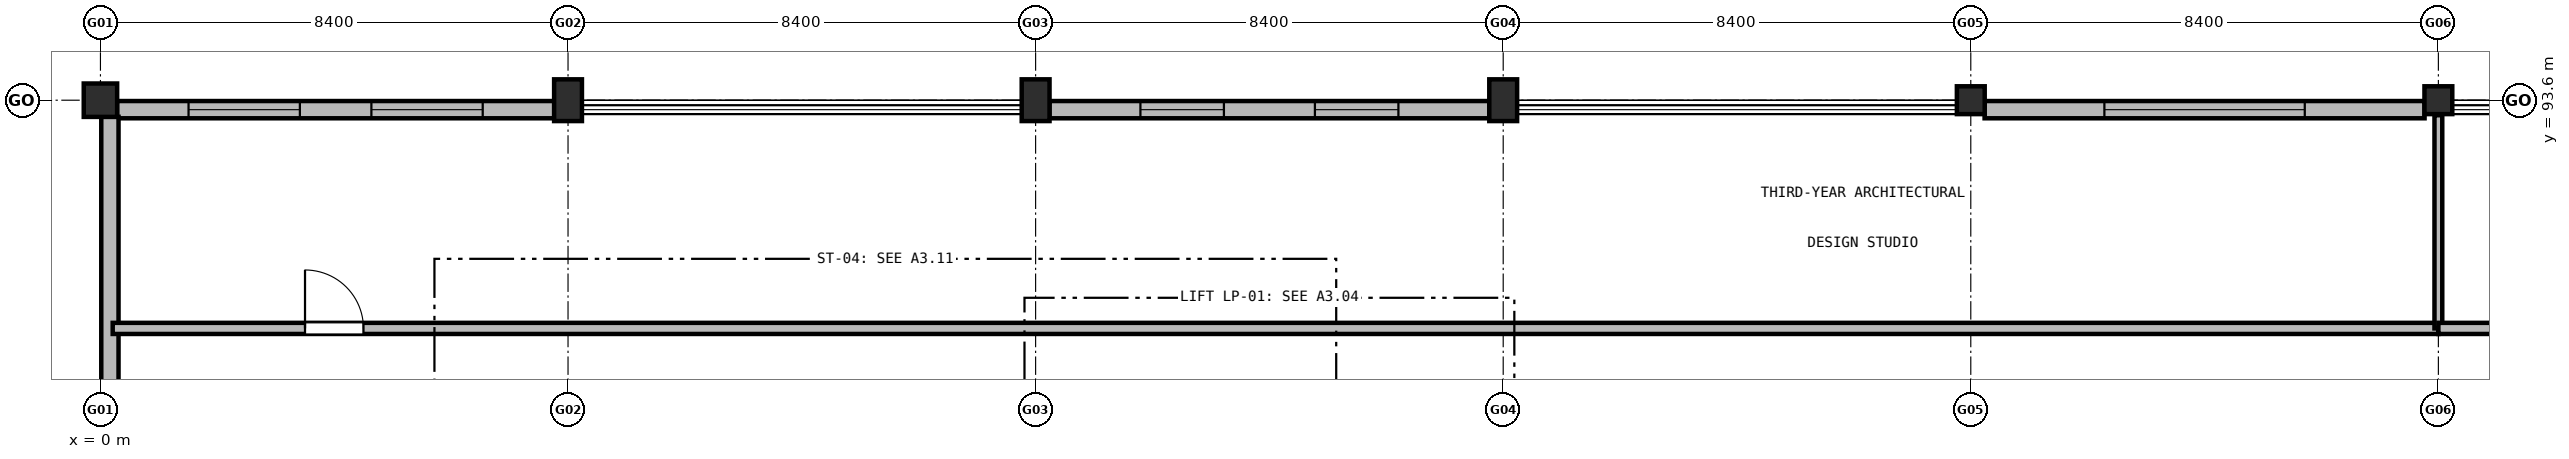
"""IFC4 building model, lengths in metres.
Left out: names, types, materials, properties, quantities, classifications, styles, units other than length and angle.
Written with IfcOpenShell. Run it as: python <this file> out.ifc"""

import sys

from ifc_helpers import new_model, si_unit, direction, frame, frame_2d, origin, origin_2d, place, context, subcontext, project, spatial, rectangle, extrude, element, fill, save


model = new_model("IFC4")
c1 = context("Model", 3, precision=1e-05, world=origin(), true_north=direction((0.0, 1.0)))
c2 = subcontext(c1, "Body", "Model", "MODEL_VIEW")
j1 = project(units=[si_unit("LENGTHUNIT", "METRE"), si_unit("PLANEANGLEUNIT", "RADIAN")], contexts=[c1])
p1 = place(None, origin())
s1 = spatial("IfcSite", under=j1, at=p1, CompositionType="ELEMENT")
p2 = place(p1, origin())
s2 = spatial("IfcBuilding", under=s1, at=p2, CompositionType="ELEMENT")
p3 = place(p2, frame((0.0, 0.0, 13.5)))
s3 = spatial("IfcBuildingStorey", under=s2, at=p3, CompositionType="ELEMENT", Elevation=13.5)
p4 = place(p3, frame((0.0, 93.6, 0.0), z_axis=(0.0, 0.0, 1.0), x_axis=(1.0, 0.0, 0.0)))
e1 = element("IfcColumn", 1, at=p4, inside=s3, PredefinedType="COLUMN", context=c2, shape_type="SweptSolid", body=[
    extrude(rectangle(XDim=0.6, YDim=0.6, at=origin_2d()), origin(), (0.0, 0.0, 1.0), 4.2),
])
for number, where, z_axis, x_axis in (
    (2, (8.4, 93.6, 0.0), (0.0, 0.0, 1.0), (1.0, 0.0, 0.0)),
    (3, (16.8, 93.6, 0.0), (0.0, 0.0, 1.0), (1.0, 0.0, 0.0)),
    (4, (25.2, 93.6, 0.0), (0.0, 0.0, 1.0), (1.0, 0.0, 0.0)),
):
    element("IfcColumn", number, at=place(p3, frame(where, z_axis=z_axis, x_axis=x_axis)), inside=s3, PredefinedType="COLUMN", context=c2, shape_type="SweptSolid", body=[
        extrude(rectangle(XDim=0.5, YDim=0.75, at=origin_2d()), origin(), (0.0, 0.0, 1.0), 4.2),
    ])
for number, where, z_axis, x_axis in (
    (5, (33.6, 93.6, 0.0), (0.0, 0.0, 1.0), (1.0, 0.0, 0.0)),
    (6, (42.0, 93.6, 0.0), (0.0, 0.0, 1.0), (1.0, 0.0, 0.0)),
):
    element("IfcColumn", number, at=place(p3, frame(where, z_axis=z_axis, x_axis=x_axis)), inside=s3, PredefinedType="COLUMN", context=c2, shape_type="SweptSolid", body=[
        extrude(rectangle(XDim=0.5, YDim=0.5, at=origin_2d()), origin(), (0.0, 0.0, 1.0), 4.2),
    ])
p5 = place(p3, frame((0.298, 93.43, 0.0), z_axis=(0.0, 0.0, 1.0), x_axis=(1.0, 0.0, 0.0)))
e7 = element("IfcWall", 7, at=p5, inside=s3, PredefinedType="SOLIDWALL", context=c2, shape_type="SweptSolid", body=[
    extrude(rectangle(XDim=7.854, YDim=0.31, at=frame_2d((3.927, 0.0))), origin(), (0.0, 0.0, 1.0), 3.16),
])
p6 = place(p5, frame((1.285, 0.0, 0.95)))
e8 = element("IfcOpeningElement", 8, at=p6, cuts=e7, PredefinedType="OPENING", context=c2, shape_type="SweptSolid", body=[
    extrude(rectangle(XDim=2.0, YDim=1.5, at=frame_2d((1.0, 0.75))), frame((0.0, 0.165, 0.0), z_axis=(0.0, -1.0, 0.0), x_axis=(1.0, 0.0, 0.0)), (0.0, 0.0, 1.0), 0.33),
])
p7 = place(p5, frame((4.569, 0.0, 0.95)))
e9 = element("IfcOpeningElement", 9, at=p7, cuts=e7, PredefinedType="OPENING", context=c2, shape_type="SweptSolid", body=[
    extrude(rectangle(XDim=2.0, YDim=1.5, at=frame_2d((1.0, 0.75))), frame((0.0, 0.165, 0.0), z_axis=(0.0, -1.0, 0.0), x_axis=(1.0, 0.0, 0.0)), (0.0, 0.0, 1.0), 0.33),
])
p8 = place(p3, frame((17.048, 93.43, 0.0), z_axis=(0.0, 0.0, 1.0), x_axis=(1.0, 0.0, 0.0)))
e10 = element("IfcWall", 10, at=p8, inside=s3, PredefinedType="SOLIDWALL", context=c2, shape_type="SweptSolid", body=[
    extrude(rectangle(XDim=7.904, YDim=0.31, at=frame_2d((3.952, 0.0))), origin(), (0.0, 0.0, 1.0), 3.16),
])
p9 = place(p8, frame((1.635, 0.0, 0.95)))
e11 = element("IfcOpeningElement", 11, at=p9, cuts=e10, PredefinedType="OPENING", context=c2, shape_type="SweptSolid", body=[
    extrude(rectangle(XDim=1.5, YDim=1.4, at=frame_2d((0.75, 0.7))), frame((0.0, 0.165, 0.0), z_axis=(0.0, -1.0, 0.0), x_axis=(1.0, 0.0, 0.0)), (0.0, 0.0, 1.0), 0.33),
])
p10 = place(p8, frame((4.769, 0.0, 0.95)))
e12 = element("IfcOpeningElement", 12, at=p10, cuts=e10, PredefinedType="OPENING", context=c2, shape_type="SweptSolid", body=[
    extrude(rectangle(XDim=1.5, YDim=1.4, at=frame_2d((0.75, 0.7))), frame((0.0, 0.165, 0.0), z_axis=(0.0, -1.0, 0.0), x_axis=(1.0, 0.0, 0.0)), (0.0, 0.0, 1.0), 0.33),
])
p11 = place(p3, frame((33.848, 93.43, 0.0), z_axis=(0.0, 0.0, 1.0), x_axis=(1.0, 0.0, 0.0)))
e13 = element("IfcWall", 13, at=p11, inside=s3, PredefinedType="SOLIDWALL", context=c2, shape_type="SweptSolid", body=[
    extrude(rectangle(XDim=7.904, YDim=0.31, at=frame_2d((3.952, 0.0))), origin(), (0.0, 0.0, 1.0), 3.16),
])
p12 = place(p11, frame((2.152, 0.0, 0.95)))
e14 = element("IfcOpeningElement", 14, at=p12, cuts=e13, PredefinedType="OPENING", context=c2, shape_type="SweptSolid", body=[
    extrude(rectangle(XDim=3.6, YDim=1.96, at=frame_2d((1.8, 0.98))), frame((0.0, 0.165, 0.0), z_axis=(0.0, -1.0, 0.0), x_axis=(1.0, 0.0, 0.0)), (0.0, 0.0, 1.0), 0.33),
])
p13 = place(p3, frame((0.17, 86.698, 0.0), z_axis=(0.0, 0.0, 1.0), x_axis=(0.0, 1.0, 0.0)))
e15 = element("IfcWall", 15, at=p13, inside=s3, PredefinedType="SOLIDWALL", context=c2, shape_type="SweptSolid", body=[
    extrude(rectangle(XDim=6.604, YDim=0.31, at=frame_2d((3.302, 0.0))), origin(), (0.0, 0.0, 1.0), 3.36),
])
p14 = place(p3, frame((0.22, 89.5, 0.0), z_axis=(0.0, 0.0, 1.0), x_axis=(1.0, 0.0, 0.0)))
e16 = element("IfcWall", 16, at=p14, inside=s3, PredefinedType="SOLIDWALL", context=c2, shape_type="SweptSolid", body=[
    extrude(rectangle(XDim=41.78, YDim=0.2, at=frame_2d((20.89, 0.0))), origin(), (0.0, 0.0, 1.0), 3.355),
])
p15 = place(p14, frame((3.455, 0.0, 0.0)))
e17 = element("IfcOpeningElement", 17, at=p15, cuts=e16, PredefinedType="OPENING", context=c2, shape_type="SweptSolid", body=[
    extrude(rectangle(XDim=1.05, YDim=2.15, at=frame_2d((0.525, 1.075))), frame((0.0, 0.11, 0.0), z_axis=(0.0, -1.0, 0.0), x_axis=(1.0, 0.0, 0.0)), (0.0, 0.0, 1.0), 0.22),
])
p16 = place(p3, frame((42.0, 89.5, 0.0), z_axis=(0.0, 0.0, 1.0), x_axis=(0.0, 1.0, 0.0)))
e18 = element("IfcWall", 18, at=p16, inside=s3, PredefinedType="PARTITIONING", context=c2, shape_type="SweptSolid", body=[
    extrude(rectangle(XDim=3.83, YDim=0.14, at=frame_2d((1.915, 0.0))), origin(), (0.0, 0.0, 1.0), 3.155),
])
p17 = place(p3, frame((42.0, 89.5, 0.0), z_axis=(0.0, 0.0, 1.0), x_axis=(1.0, 0.0, 0.0)))
e19 = element("IfcWall", 19, at=p17, inside=s3, PredefinedType="SOLIDWALL", context=c2, shape_type="SweptSolid", body=[
    extrude(rectangle(XDim=42.0, YDim=0.2, at=frame_2d((21.0, 0.0))), origin(), (0.0, 0.0, 1.0), 3.355),
])
p18 = place(p17, frame((3.7, 0.0, 0.0)))
e20 = element("IfcOpeningElement", 20, at=p18, cuts=e19, PredefinedType="OPENING", context=c2, shape_type="SweptSolid", body=[
    extrude(rectangle(XDim=1.0, YDim=2.1, at=frame_2d((0.5, 1.05))), frame((0.0, 0.11, 0.0), z_axis=(0.0, -1.0, 0.0), x_axis=(1.0, 0.0, 0.0)), (0.0, 0.0, 1.0), 0.22),
])
p19 = place(p6, origin())
e21 = element("IfcWindow", 21, at=p19, inside=s3, PartitioningType="SINGLE_PANEL", PredefinedType="WINDOW", context=c2, shape_type="SweptSolid", body=[
    extrude(rectangle(XDim=2.0, YDim=1.5, at=frame_2d((1.0, 0.75))), frame((0.0, 0.03, 0.0), z_axis=(0.0, -1.0, 0.0), x_axis=(1.0, 0.0, 0.0)), (0.0, 0.0, 1.0), 0.06),
])
fill(e8, e21)
p20 = place(p7, origin())
e22 = element("IfcWindow", 22, at=p20, inside=s3, PartitioningType="SINGLE_PANEL", PredefinedType="WINDOW", context=c2, shape_type="SweptSolid", body=[
    extrude(rectangle(XDim=2.0, YDim=1.5, at=frame_2d((1.0, 0.75))), frame((0.0, 0.03, 0.0), z_axis=(0.0, -1.0, 0.0), x_axis=(1.0, 0.0, 0.0)), (0.0, 0.0, 1.0), 0.06),
])
fill(e9, e22)
p21 = place(p9, origin())
e23 = element("IfcWindow", 23, at=p21, inside=s3, PartitioningType="SINGLE_PANEL", PredefinedType="WINDOW", context=c2, shape_type="SweptSolid", body=[
    extrude(rectangle(XDim=1.5, YDim=1.4, at=frame_2d((0.75, 0.7))), frame((0.0, 0.03, 0.0), z_axis=(0.0, -1.0, 0.0), x_axis=(1.0, 0.0, 0.0)), (0.0, 0.0, 1.0), 0.06),
])
fill(e11, e23)
p22 = place(p10, origin())
e24 = element("IfcWindow", 24, at=p22, inside=s3, PartitioningType="SINGLE_PANEL", PredefinedType="WINDOW", context=c2, shape_type="SweptSolid", body=[
    extrude(rectangle(XDim=1.5, YDim=1.4, at=frame_2d((0.75, 0.7))), frame((0.0, 0.03, 0.0), z_axis=(0.0, -1.0, 0.0), x_axis=(1.0, 0.0, 0.0)), (0.0, 0.0, 1.0), 0.06),
])
fill(e12, e24)
p23 = place(p12, origin())
e25 = element("IfcWindow", 25, at=p23, inside=s3, PartitioningType="SINGLE_PANEL", PredefinedType="WINDOW", context=c2, shape_type="SweptSolid", body=[
    extrude(rectangle(XDim=3.6, YDim=1.96, at=frame_2d((1.8, 0.98))), frame((0.0, 0.03, 0.0), z_axis=(0.0, -1.0, 0.0), x_axis=(1.0, 0.0, 0.0)), (0.0, 0.0, 1.0), 0.06),
])
fill(e14, e25)
p24 = place(p15, origin())
e26 = element("IfcDoor", 26, at=p24, inside=s3, OperationType="SINGLE_SWING_LEFT", PredefinedType="DOOR", context=c2, shape_type="SweptSolid", body=[
    extrude(rectangle(XDim=1.05, YDim=2.15, at=frame_2d((0.525, 1.075))), frame((0.0, 0.025, 0.0), z_axis=(0.0, -1.0, 0.0), x_axis=(1.0, 0.0, 0.0)), (0.0, 0.0, 1.0), 0.05),
])
fill(e17, e26)
save(model, sys.argv[1])
